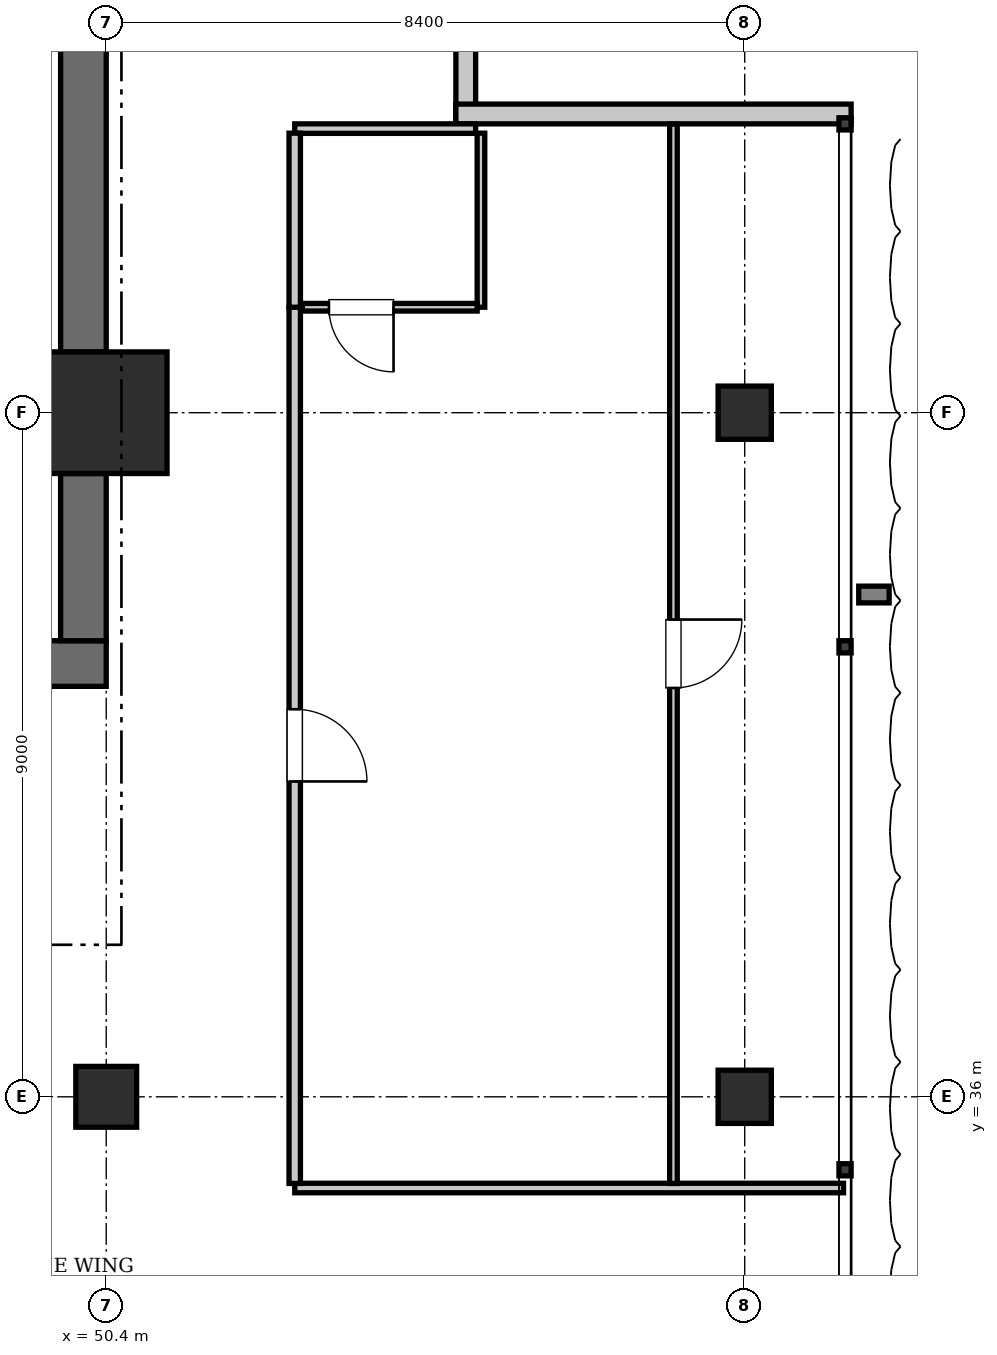
"""IFC4 building model, lengths in metres.
Left out: names, types, materials, properties, quantities, classifications, styles, units other than length and angle.
Written with IfcOpenShell. Run it as: python <this file> out.ifc"""

import sys

from ifc_helpers import new_model, si_unit, direction, frame, frame_2d, origin, origin_2d, place, context, subcontext, project, spatial, rectangle, extrude, element, fill, save


model = new_model("IFC4")
c1 = context("Model", 3, precision=1e-05, world=origin(), true_north=direction((0.0, 1.0)))
c2 = subcontext(c1, "Body", "Model", "MODEL_VIEW")
j1 = project(units=[si_unit("LENGTHUNIT", "METRE"), si_unit("PLANEANGLEUNIT", "RADIAN")], contexts=[c1])
p1 = place(None, origin())
s1 = spatial("IfcSite", under=j1, at=p1, CompositionType="ELEMENT")
p2 = place(p1, origin())
s2 = spatial("IfcBuilding", under=s1, at=p2, CompositionType="ELEMENT")
p3 = place(p2, frame((0.0, 0.0, 308.7)))
s3 = spatial("IfcBuildingStorey", under=s2, at=p3, CompositionType="ELEMENT", Elevation=308.7)
p4 = place(p3, frame((50.4, 45.0, 0.0), z_axis=(0.0, 0.0, 1.0), x_axis=(1.0, 0.0, 0.0)))
e1 = element("IfcColumn", 1, at=p4, inside=s3, PredefinedType="COLUMN", context=c2, shape_type="SweptSolid", body=[
    extrude(rectangle(XDim=1.6, YDim=1.6, at=origin_2d()), origin(), (0.0, 0.0, 1.0), 3.85),
])
p5 = place(p3, frame((43.6, 41.7, 0.0), z_axis=(0.0, 0.0, 1.0), x_axis=(1.0, 0.0, 0.0)))
e2 = element("IfcWall", 2, at=p5, inside=s3, PredefinedType="SHEAR", context=c2, shape_type="SweptSolid", body=[
    extrude(rectangle(XDim=6.8, YDim=0.6, at=frame_2d((3.4, 0.0))), origin(), (0.0, 0.0, 1.0), 3.85),
])
p6 = place(p5, frame((3.9, 0.0, 0.0)))
e3 = element("IfcOpeningElement", 3, at=p6, cuts=e2, PredefinedType="OPENING", context=c2, shape_type="SweptSolid", body=[
    extrude(rectangle(XDim=1.15, YDim=2.15, at=frame_2d((0.575, 1.075))), frame((0.0, 0.31, 0.0), z_axis=(0.0, -1.0, 0.0), x_axis=(1.0, 0.0, 0.0)), (0.0, 0.0, 1.0), 0.62),
])
p7 = place(p5, frame((0.55, 0.0, 0.0)))
e4 = element("IfcOpeningElement", 4, at=p7, cuts=e2, PredefinedType="OPENING", context=c2, shape_type="SweptSolid", body=[
    extrude(rectangle(XDim=1.1, YDim=2.2, at=frame_2d((0.55, 1.1))), frame((0.0, 0.31, 0.0), z_axis=(0.0, -1.0, 0.0), x_axis=(1.0, 0.0, 0.0)), (0.0, 0.0, 1.0), 0.62),
])
p8 = place(p3, frame((50.1, 42.0, 0.0), z_axis=(0.0, 0.0, 1.0), x_axis=(0.0, 1.0, 0.0)))
e5 = element("IfcWall", 5, at=p8, inside=s3, PredefinedType="SHEAR", context=c2, shape_type="SweptSolid", body=[
    extrude(rectangle(XDim=2.2, YDim=0.6, at=frame_2d((1.1, 0.0))), origin(), (0.0, 0.0, 1.0), 3.85),
])
p9 = place(p3, frame((50.1, 45.8, 0.0), z_axis=(0.0, 0.0, 1.0), x_axis=(0.0, 1.0, 0.0)))
e6 = element("IfcWall", 6, at=p9, inside=s3, PredefinedType="SHEAR", context=c2, shape_type="SweptSolid", body=[
    extrude(rectangle(XDim=7.6, YDim=0.6, at=frame_2d((3.8, 0.0))), origin(), (0.0, 0.0, 1.0), 3.85),
])
p10 = place(p3, frame((50.4, 36.0, 0.0), z_axis=(0.0, 0.0, 1.0), x_axis=(1.0, 0.0, 0.0)))
e7 = element("IfcColumn", 7, at=p10, inside=s3, PredefinedType="COLUMN", context=c2, shape_type="SweptSolid", body=[
    extrude(rectangle(XDim=0.8, YDim=0.8, at=origin_2d()), origin(), (0.0, 0.0, 1.0), 3.85),
])
for number, where, z_axis, x_axis in (
    (8, (58.8, 36.0, 0.0), (0.0, 0.0, 1.0), (1.0, 0.0, 0.0)),
    (9, (58.8, 45.0, 0.0), (0.0, 0.0, 1.0), (1.0, 0.0, 0.0)),
):
    element("IfcColumn", number, at=place(p3, frame(where, z_axis=z_axis, x_axis=x_axis)), inside=s3, PredefinedType="COLUMN", context=c2, shape_type="SweptSolid", body=[
        extrude(rectangle(XDim=0.7, YDim=0.7, at=origin_2d()), origin(), (0.0, 0.0, 1.0), 3.85),
    ])
for number, where, z_axis, x_axis in (
    (10, (55.13, 54.0, 0.0), (0.0, 0.0, 1.0), (0.0, -1.0, 0.0)),
    (11, (55.0, 48.93, 0.0), (0.0, 0.0, 1.0), (1.0, 0.0, 0.0)),
):
    element("IfcWall", number, at=place(p3, frame(where, z_axis=z_axis, x_axis=x_axis)), inside=s3, PredefinedType="SOLIDWALL", context=c2, shape_type="SweptSolid", body=[
        extrude(rectangle(XDim=5.2, YDim=0.26, at=frame_2d((2.6, 0.0))), origin(), (0.0, 0.0, 1.0), 3.61),
    ])
p11 = place(p3, frame((52.88, 34.8, 0.0), z_axis=(0.0, 0.0, 1.0), x_axis=(1.0, 0.0, 0.0)))
e12 = element("IfcWall", 12, at=p11, inside=s3, PredefinedType="PARTITIONING", context=c2, shape_type="SweptSolid", body=[
    extrude(rectangle(XDim=7.22, YDim=0.125, at=frame_2d((3.61, 0.0))), origin(), (0.0, 0.0, 1.0), 3.61),
])
p12 = place(p3, frame((52.88, 48.738, 0.0), z_axis=(0.0, 0.0, 1.0), x_axis=(1.0, 0.0, 0.0)))
e13 = element("IfcWall", 13, at=p12, inside=s3, PredefinedType="PARTITIONING", context=c2, shape_type="SweptSolid", body=[
    extrude(rectangle(XDim=2.38, YDim=0.125, at=frame_2d((1.19, 0.0))), origin(), (0.0, 0.0, 1.0), 3.61),
])
p13 = place(p3, frame((52.88, 34.86, 0.0), z_axis=(0.0, 0.0, 1.0), x_axis=(0.0, 1.0, 0.0)))
e14 = element("IfcWall", 14, at=p13, inside=s3, PredefinedType="PARTITIONING", context=c2, shape_type="SweptSolid", body=[
    extrude(rectangle(XDim=11.527, YDim=0.15, at=frame_2d((5.764, 0.0))), origin(), (0.0, 0.0, 1.0), 3.61),
])
p14 = place(p13, frame((5.289, 0.0, 0.0)))
e15 = element("IfcOpeningElement", 15, at=p14, cuts=e14, PredefinedType="OPENING", context=c2, shape_type="SweptSolid", body=[
    extrude(rectangle(XDim=0.95, YDim=2.15, at=frame_2d((0.475, 1.075))), frame((0.0, 0.085, 0.0), z_axis=(0.0, -1.0, 0.0), x_axis=(1.0, 0.0, 0.0)), (0.0, 0.0, 1.0), 0.17),
])
p15 = place(p3, frame((52.88, 46.387, 0.0), z_axis=(0.0, 0.0, 1.0), x_axis=(0.0, 1.0, 0.0)))
e16 = element("IfcWall", 16, at=p15, inside=s3, PredefinedType="PARTITIONING", context=c2, shape_type="SweptSolid", body=[
    extrude(rectangle(XDim=2.29, YDim=0.15, at=frame_2d((1.145, 0.0))), origin(), (0.0, 0.0, 1.0), 3.61),
])
p16 = place(p3, frame((55.33, 46.387, 0.0), z_axis=(0.0, 0.0, 1.0), x_axis=(0.0, 1.0, 0.0)))
e17 = element("IfcWall", 17, at=p16, inside=s3, PredefinedType="PARTITIONING", context=c2, shape_type="SweptSolid", body=[
    extrude(rectangle(XDim=2.29, YDim=0.1, at=frame_2d((1.145, 0.0))), origin(), (0.0, 0.0, 1.0), 3.61),
])
p17 = place(p3, frame((52.98, 46.387, 0.0), z_axis=(0.0, 0.0, 1.0), x_axis=(1.0, 0.0, 0.0)))
e18 = element("IfcWall", 18, at=p17, inside=s3, PredefinedType="PARTITIONING", context=c2, shape_type="SweptSolid", body=[
    extrude(rectangle(XDim=2.3, YDim=0.1, at=frame_2d((1.15, 0.0))), origin(), (0.0, 0.0, 1.0), 3.61),
])
p18 = place(p17, frame((0.35, 0.0, 0.0)))
e19 = element("IfcOpeningElement", 19, at=p18, cuts=e18, PredefinedType="OPENING", context=c2, shape_type="SweptSolid", body=[
    extrude(rectangle(XDim=0.85, YDim=2.1, at=frame_2d((0.425, 1.05))), frame((0.0, 0.06, 0.0), z_axis=(0.0, -1.0, 0.0), x_axis=(1.0, 0.0, 0.0)), (0.0, 0.0, 1.0), 0.12),
])
p19 = place(p3, frame((57.862, 34.86, 0.0), z_axis=(0.0, 0.0, 1.0), x_axis=(0.0, 1.0, 0.0)))
e20 = element("IfcWall", 20, at=p19, inside=s3, PredefinedType="PARTITIONING", context=c2, shape_type="SweptSolid", body=[
    extrude(rectangle(XDim=13.938, YDim=0.1, at=frame_2d((6.969, 0.0))), origin(), (0.0, 0.0, 1.0), 3.61),
])
p20 = place(p19, frame((6.519, 0.0, 0.0)))
e21 = element("IfcOpeningElement", 21, at=p20, cuts=e20, PredefinedType="OPENING", context=c2, shape_type="SweptSolid", body=[
    extrude(rectangle(XDim=0.9, YDim=2.1, at=frame_2d((0.45, 1.05))), frame((0.0, 0.06, 0.0), z_axis=(0.0, -1.0, 0.0), x_axis=(1.0, 0.0, 0.0)), (0.0, 0.0, 1.0), 0.12),
])
p21 = place(p18, frame((0.85, 0.0, 0.0), z_axis=(0.0, 0.0, 1.0), x_axis=(-1.0, 0.0, 0.0)))
e22 = element("IfcDoor", 22, at=p21, inside=s3, OperationType="SINGLE_SWING_LEFT", PredefinedType="DOOR", context=c2, shape_type="SweptSolid", body=[
    extrude(rectangle(XDim=0.85, YDim=2.1, at=frame_2d((0.425, 1.05))), frame((0.0, 0.025, 0.0), z_axis=(0.0, -1.0, 0.0), x_axis=(1.0, 0.0, 0.0)), (0.0, 0.0, 1.0), 0.05),
])
fill(e19, e22)
p22 = place(p14, frame((0.95, 0.0, 0.0), z_axis=(0.0, 0.0, 1.0), x_axis=(-1.0, 0.0, 0.0)))
e23 = element("IfcDoor", 23, at=p22, inside=s3, OperationType="SINGLE_SWING_RIGHT", PredefinedType="DOOR", context=c2, shape_type="SweptSolid", body=[
    extrude(rectangle(XDim=0.95, YDim=2.15, at=frame_2d((0.475, 1.075))), frame((0.0, 0.025, 0.0), z_axis=(0.0, -1.0, 0.0), x_axis=(1.0, 0.0, 0.0)), (0.0, 0.0, 1.0), 0.05),
])
fill(e15, e23)
p23 = place(p20, frame((0.9, 0.0, 0.0), z_axis=(0.0, 0.0, 1.0), x_axis=(-1.0, 0.0, 0.0)))
e24 = element("IfcDoor", 24, at=p23, inside=s3, OperationType="SINGLE_SWING_LEFT", PredefinedType="DOOR", context=c2, shape_type="SweptSolid", body=[
    extrude(rectangle(XDim=0.9, YDim=2.1, at=frame_2d((0.45, 1.05))), frame((0.0, 0.025, 0.0), z_axis=(0.0, -1.0, 0.0), x_axis=(1.0, 0.0, 0.0)), (0.0, 0.0, 1.0), 0.05),
])
fill(e21, e24)
save(model, sys.argv[1])
